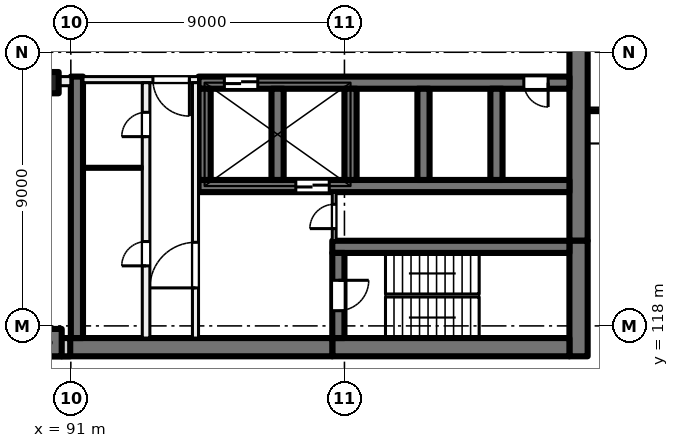
"""IFC4 building model, lengths in metres.
Left out: names, types, materials, properties, quantities, classifications, styles, units other than length and angle.
Written with IfcOpenShell. Run it as: python <this file> out.ifc"""

import sys

from ifc_helpers import new_model, si_unit, direction, frame, frame_2d, origin, origin_2d, place, context, subcontext, project, spatial, rectangle, extrude, element, fill, save


model = new_model("IFC4")
c1 = context("Model", 3, precision=1e-05, world=origin(), true_north=direction((0.0, 1.0)))
c2 = subcontext(c1, "Body", "Model", "MODEL_VIEW")
j1 = project(units=[si_unit("LENGTHUNIT", "METRE"), si_unit("PLANEANGLEUNIT", "RADIAN")], contexts=[c1])
p1 = place(None, origin())
s1 = spatial("IfcSite", under=j1, at=p1, CompositionType="ELEMENT")
p2 = place(p1, origin())
s2 = spatial("IfcBuilding", under=s1, at=p2, CompositionType="ELEMENT")
p3 = place(p2, frame((0.0, 0.0, 31.5)))
s3 = spatial("IfcBuildingStorey", under=s2, at=p3, CompositionType="ELEMENT", Elevation=31.5)
p4 = place(p3, frame((90.25, 126.0, 0.0), z_axis=(0.0, 0.0, 1.0), x_axis=(1.0, 0.0, 0.0)))
e1 = element("IfcColumn", 1, at=p4, inside=s3, PredefinedType="COLUMN", context=c2, shape_type="SweptSolid", body=[
    extrude(rectangle(XDim=0.7, YDim=0.7, at=origin_2d()), origin(), (0.0, 0.0, 1.0), 4.0),
])
p5 = place(p3, frame((90.25, 117.45, 0.0), z_axis=(0.0, 0.0, 1.0), x_axis=(1.0, 0.0, 0.0)))
e2 = element("IfcColumn", 2, at=p5, inside=s3, PredefinedType="COLUMN", context=c2, shape_type="SweptSolid", body=[
    extrude(rectangle(XDim=0.9, YDim=0.9, at=origin_2d()), origin(), (0.0, 0.0, 1.0), 4.0),
])
p6 = place(p3, frame((107.7, 135.2, 0.0), z_axis=(0.0, 0.0, 1.0), x_axis=(0.0, -1.0, 0.0)))
e3 = element("IfcWall", 3, at=p6, inside=s3, PredefinedType="SHEAR", context=c2, shape_type="SweptSolid", body=[
    extrude(rectangle(XDim=14.4, YDim=0.6, at=frame_2d((7.2, 0.0))), origin(), (0.0, 0.0, 1.0), 4.0),
])
p7 = place(p6, frame((6.3, 0.0, 0.0)))
e4 = element("IfcOpeningElement", 4, at=p7, cuts=e3, PredefinedType="OPENING", context=c2, shape_type="SweptSolid", body=[
    extrude(rectangle(XDim=1.8, YDim=2.1, at=frame_2d((0.9, 1.05))), frame((0.0, 0.31, 0.0), z_axis=(0.0, -1.0, 0.0), x_axis=(1.0, 0.0, 0.0)), (0.0, 0.0, 1.0), 0.62),
])
p8 = place(p3, frame((107.7, 120.8, 0.0), z_axis=(0.0, 0.0, 1.0), x_axis=(0.0, -1.0, 0.0)))
e5 = element("IfcWall", 5, at=p8, inside=s3, PredefinedType="SHEAR", context=c2, shape_type="SweptSolid", body=[
    extrude(rectangle(XDim=3.8, YDim=0.6, at=frame_2d((1.9, 0.0))), origin(), (0.0, 0.0, 1.0), 4.0),
])
p9 = place(p3, frame((107.4, 117.3, 0.0), z_axis=(0.0, 0.0, 1.0), x_axis=(-1.0, 0.0, 0.0)))
e6 = element("IfcWall", 6, at=p9, inside=s3, PredefinedType="SHEAR", context=c2, shape_type="SweptSolid", body=[
    extrude(rectangle(XDim=7.8, YDim=0.6, at=frame_2d((3.9, 0.0))), origin(), (0.0, 0.0, 1.0), 4.0),
])
p10 = place(p3, frame((99.6, 117.3, 0.0), z_axis=(0.0, 0.0, 1.0), x_axis=(-1.0, 0.0, 0.0)))
e7 = element("IfcWall", 7, at=p10, inside=s3, PredefinedType="SHEAR", context=c2, shape_type="SweptSolid", body=[
    extrude(rectangle(XDim=8.9, YDim=0.6, at=frame_2d((4.45, 0.0))), origin(), (0.0, 0.0, 1.0), 4.0),
])
p11 = place(p3, frame((107.4, 120.6, 0.0), z_axis=(0.0, 0.0, 1.0), x_axis=(-1.0, 0.0, 0.0)))
e8 = element("IfcWall", 8, at=p11, inside=s3, PredefinedType="SHEAR", context=c2, shape_type="SweptSolid", body=[
    extrude(rectangle(XDim=7.8, YDim=0.4, at=frame_2d((3.9, 0.0))), origin(), (0.0, 0.0, 1.0), 4.0),
])
p12 = place(p3, frame((99.8, 120.4, 0.0), z_axis=(0.0, 0.0, 1.0), x_axis=(0.0, -1.0, 0.0)))
e9 = element("IfcWall", 9, at=p12, inside=s3, PredefinedType="SHEAR", context=c2, shape_type="SweptSolid", body=[
    extrude(rectangle(XDim=2.8, YDim=0.4, at=frame_2d((1.4, 0.0))), origin(), (0.0, 0.0, 1.0), 4.0),
])
p13 = place(p12, frame((0.9, 0.0, 0.0)))
e10 = element("IfcOpeningElement", 10, at=p13, cuts=e9, PredefinedType="OPENING", context=c2, shape_type="SweptSolid", body=[
    extrude(rectangle(XDim=1.0, YDim=2.1, at=frame_2d((0.5, 1.05))), frame((0.0, 0.21, 0.0), z_axis=(0.0, -1.0, 0.0), x_axis=(1.0, 0.0, 0.0)), (0.0, 0.0, 1.0), 0.42),
])
p14 = place(p3, frame((107.4, 126.0, 0.0), z_axis=(0.0, 0.0, 1.0), x_axis=(-1.0, 0.0, 0.0)))
e11 = element("IfcWall", 11, at=p14, inside=s3, PredefinedType="SHEAR", context=c2, shape_type="SweptSolid", body=[
    extrude(rectangle(XDim=12.2, YDim=0.4, at=frame_2d((6.1, 0.0))), origin(), (0.0, 0.0, 1.0), 4.0),
])
p15 = place(p14, frame((10.25, 0.0, 0.0)))
e12 = element("IfcOpeningElement", 12, at=p15, cuts=e11, PredefinedType="OPENING", context=c2, shape_type="SweptSolid", body=[
    extrude(rectangle(XDim=1.1, YDim=2.1, at=frame_2d((0.55, 1.05))), frame((0.0, 0.21, 0.0), z_axis=(0.0, -1.0, 0.0), x_axis=(1.0, 0.0, 0.0)), (0.0, 0.0, 1.0), 0.42),
])
p16 = place(p14, frame((0.7, 0.0, 0.0)))
e13 = element("IfcOpeningElement", 13, at=p16, cuts=e11, PredefinedType="OPENING", context=c2, shape_type="SweptSolid", body=[
    extrude(rectangle(XDim=0.8, YDim=2.1, at=frame_2d((0.4, 1.05))), frame((0.0, 0.21, 0.0), z_axis=(0.0, -1.0, 0.0), x_axis=(1.0, 0.0, 0.0)), (0.0, 0.0, 1.0), 0.42),
])
p17 = place(p3, frame((107.4, 122.6, 0.0), z_axis=(0.0, 0.0, 1.0), x_axis=(-1.0, 0.0, 0.0)))
e14 = element("IfcWall", 14, at=p17, inside=s3, PredefinedType="SHEAR", context=c2, shape_type="SweptSolid", body=[
    extrude(rectangle(XDim=12.2, YDim=0.4, at=frame_2d((6.1, 0.0))), origin(), (0.0, 0.0, 1.0), 4.0),
])
p18 = place(p17, frame((7.9, 0.0, 0.0)))
e15 = element("IfcOpeningElement", 15, at=p18, cuts=e14, PredefinedType="OPENING", context=c2, shape_type="SweptSolid", body=[
    extrude(rectangle(XDim=1.1, YDim=2.1, at=frame_2d((0.55, 1.05))), frame((0.0, 0.21, 0.0), z_axis=(0.0, -1.0, 0.0), x_axis=(1.0, 0.0, 0.0)), (0.0, 0.0, 1.0), 0.42),
])
for number, where, z_axis, x_axis in (
    (16, (105.0, 125.8, 0.0), (0.0, 0.0, 1.0), (0.0, -1.0, 0.0)),
    (17, (102.6, 125.8, 0.0), (0.0, 0.0, 1.0), (0.0, -1.0, 0.0)),
    (18, (100.2, 125.8, 0.0), (0.0, 0.0, 1.0), (0.0, -1.0, 0.0)),
    (19, (97.8, 125.8, 0.0), (0.0, 0.0, 1.0), (0.0, -1.0, 0.0)),
    (20, (95.4, 125.8, 0.0), (0.0, 0.0, 1.0), (0.0, -1.0, 0.0)),
):
    element("IfcWall", number, at=place(p3, frame(where, z_axis=z_axis, x_axis=x_axis)), inside=s3, PredefinedType="SHEAR", context=c2, shape_type="SweptSolid", body=[
        extrude(rectangle(XDim=3.0, YDim=0.4, at=frame_2d((1.5, 0.0))), origin(), (0.0, 0.0, 1.0), 4.0),
    ])
p19 = place(p3, frame((91.2, 126.2, 0.0), z_axis=(0.0, 0.0, 1.0), x_axis=(0.0, -1.0, 0.0)))
e21 = element("IfcWall", 21, at=p19, inside=s3, PredefinedType="SHEAR", context=c2, shape_type="SweptSolid", body=[
    extrude(rectangle(XDim=8.6, YDim=0.4, at=frame_2d((4.3, 0.0))), origin(), (0.0, 0.0, 1.0), 4.0),
])
p20 = place(p3, frame((90.98, 117.3, 0.0), z_axis=(0.0, 0.0, 1.0), x_axis=(-1.0, 0.0, 0.0)))
e22 = element("IfcWall", 22, at=p20, inside=s3, PredefinedType="SOLIDWALL", context=c2, shape_type="SweptSolid", body=[
    extrude(rectangle(XDim=33.745, YDim=0.6, at=frame_2d((16.873, 0.0))), origin(), (0.0, 0.0, 1.0), 3.625),
])
p21 = place(p20, frame((1.48, 0.0, 0.9)))
e23 = element("IfcOpeningElement", 23, at=p21, cuts=e22, PredefinedType="OPENING", context=c2, shape_type="SweptSolid", body=[
    extrude(rectangle(XDim=3.0, YDim=2.4, at=frame_2d((1.5, 1.2))), frame((0.0, 0.31, 0.0), z_axis=(0.0, -1.0, 0.0), x_axis=(1.0, 0.0, 0.0)), (0.0, 0.0, 1.0), 0.62),
])
p22 = place(p20, frame((5.98, 0.0, 0.9)))
e24 = element("IfcOpeningElement", 24, at=p22, cuts=e22, PredefinedType="OPENING", context=c2, shape_type="SweptSolid", body=[
    extrude(rectangle(XDim=3.0, YDim=2.4, at=frame_2d((1.5, 1.2))), frame((0.0, 0.31, 0.0), z_axis=(0.0, -1.0, 0.0), x_axis=(1.0, 0.0, 0.0)), (0.0, 0.0, 1.0), 0.62),
])
p23 = place(p20, frame((10.48, 0.0, 0.9)))
e25 = element("IfcOpeningElement", 25, at=p23, cuts=e22, PredefinedType="OPENING", context=c2, shape_type="SweptSolid", body=[
    extrude(rectangle(XDim=3.0, YDim=2.4, at=frame_2d((1.5, 1.2))), frame((0.0, 0.31, 0.0), z_axis=(0.0, -1.0, 0.0), x_axis=(1.0, 0.0, 0.0)), (0.0, 0.0, 1.0), 0.62),
])
p24 = place(p20, frame((14.98, 0.0, 0.9)))
e26 = element("IfcOpeningElement", 26, at=p24, cuts=e22, PredefinedType="OPENING", context=c2, shape_type="SweptSolid", body=[
    extrude(rectangle(XDim=3.0, YDim=2.4, at=frame_2d((1.5, 1.2))), frame((0.0, 0.31, 0.0), z_axis=(0.0, -1.0, 0.0), x_axis=(1.0, 0.0, 0.0)), (0.0, 0.0, 1.0), 0.62),
])
p25 = place(p20, frame((19.48, 0.0, 0.9)))
e27 = element("IfcOpeningElement", 27, at=p25, cuts=e22, PredefinedType="OPENING", context=c2, shape_type="SweptSolid", body=[
    extrude(rectangle(XDim=3.0, YDim=2.4, at=frame_2d((1.5, 1.2))), frame((0.0, 0.31, 0.0), z_axis=(0.0, -1.0, 0.0), x_axis=(1.0, 0.0, 0.0)), (0.0, 0.0, 1.0), 0.62),
])
p26 = place(p20, frame((23.98, 0.0, 0.9)))
e28 = element("IfcOpeningElement", 28, at=p26, cuts=e22, PredefinedType="OPENING", context=c2, shape_type="SweptSolid", body=[
    extrude(rectangle(XDim=3.0, YDim=2.4, at=frame_2d((1.5, 1.2))), frame((0.0, 0.31, 0.0), z_axis=(0.0, -1.0, 0.0), x_axis=(1.0, 0.0, 0.0)), (0.0, 0.0, 1.0), 0.62),
])
p27 = place(p20, frame((29.08, 0.0, 0.0)))
e29 = element("IfcOpeningElement", 29, at=p27, cuts=e22, PredefinedType="OPENING", context=c2, shape_type="SweptSolid", body=[
    extrude(rectangle(XDim=1.8, YDim=2.4, at=frame_2d((0.9, 1.2))), frame((0.0, 0.31, 0.0), z_axis=(0.0, -1.0, 0.0), x_axis=(1.0, 0.0, 0.0)), (0.0, 0.0, 1.0), 0.62),
])
p28 = place(p3, frame((95.2, 126.1, 0.0), z_axis=(0.0, 0.0, 1.0), x_axis=(-1.0, 0.0, 0.0)))
e30 = element("IfcWall", 30, at=p28, inside=s3, PredefinedType="PARTITIONING", context=c2, shape_type="SweptSolid", body=[
    extrude(rectangle(XDim=3.8, YDim=0.2, at=frame_2d((1.9, 0.0))), origin(), (0.0, 0.0, 1.0), 3.625),
])
p29 = place(p28, frame((0.3, 0.0, 0.0)))
e31 = element("IfcOpeningElement", 31, at=p29, cuts=e30, PredefinedType="OPENING", context=c2, shape_type="SweptSolid", body=[
    extrude(rectangle(XDim=1.2, YDim=2.1, at=frame_2d((0.6, 1.05))), frame((0.0, 0.11, 0.0), z_axis=(0.0, -1.0, 0.0), x_axis=(1.0, 0.0, 0.0)), (0.0, 0.0, 1.0), 0.22),
])
p30 = place(p3, frame((95.1, 117.6, 0.0), z_axis=(0.0, 0.0, 1.0), x_axis=(0.0, 1.0, 0.0)))
e32 = element("IfcWall", 32, at=p30, inside=s3, PredefinedType="PARTITIONING", context=c2, shape_type="SweptSolid", body=[
    extrude(rectangle(XDim=8.4, YDim=0.2, at=frame_2d((4.2, 0.0))), origin(), (0.0, 0.0, 1.0), 3.625),
])
p31 = place(p30, frame((1.65, 0.0, 0.0)))
e33 = element("IfcOpeningElement", 33, at=p31, cuts=e32, PredefinedType="OPENING", context=c2, shape_type="SweptSolid", body=[
    extrude(rectangle(XDim=1.5, YDim=2.1, at=frame_2d((0.75, 1.05))), frame((0.0, 0.11, 0.0), z_axis=(0.0, -1.0, 0.0), x_axis=(1.0, 0.0, 0.0)), (0.0, 0.0, 1.0), 0.22),
])
p32 = place(p3, frame((93.475, 117.6, 0.0), z_axis=(0.0, 0.0, 1.0), x_axis=(0.0, 1.0, 0.0)))
e34 = element("IfcWall", 34, at=p32, inside=s3, PredefinedType="PARTITIONING", context=c2, shape_type="SweptSolid", body=[
    extrude(rectangle(XDim=8.4, YDim=0.25, at=frame_2d((4.2, 0.0))), origin(), (0.0, 0.0, 1.0), 3.625),
])
p33 = place(p32, frame((6.625, 0.0, 0.0)))
e35 = element("IfcOpeningElement", 35, at=p33, cuts=e34, PredefinedType="OPENING", context=c2, shape_type="SweptSolid", body=[
    extrude(rectangle(XDim=0.8, YDim=2.1, at=frame_2d((0.4, 1.05))), frame((0.0, 0.135, 0.0), z_axis=(0.0, -1.0, 0.0), x_axis=(1.0, 0.0, 0.0)), (0.0, 0.0, 1.0), 0.27),
])
p34 = place(p32, frame((2.375, 0.0, 0.0)))
e36 = element("IfcOpeningElement", 36, at=p34, cuts=e34, PredefinedType="OPENING", context=c2, shape_type="SweptSolid", body=[
    extrude(rectangle(XDim=0.8, YDim=2.1, at=frame_2d((0.4, 1.05))), frame((0.0, 0.135, 0.0), z_axis=(0.0, -1.0, 0.0), x_axis=(1.0, 0.0, 0.0)), (0.0, 0.0, 1.0), 0.27),
])
p35 = place(p3, frame((99.663, 120.8, 0.0), z_axis=(0.0, 0.0, 1.0), x_axis=(0.0, 1.0, 0.0)))
e37 = element("IfcWall", 37, at=p35, inside=s3, PredefinedType="PARTITIONING", context=c2, shape_type="SweptSolid", body=[
    extrude(rectangle(XDim=1.6, YDim=0.125, at=frame_2d((0.8, 0.0))), origin(), (0.0, 0.0, 1.0), 3.625),
])
p36 = place(p35, frame((0.4, 0.0, 0.0)))
e38 = element("IfcOpeningElement", 38, at=p36, cuts=e37, PredefinedType="OPENING", context=c2, shape_type="SweptSolid", body=[
    extrude(rectangle(XDim=0.8, YDim=2.1, at=frame_2d((0.4, 1.05))), frame((0.0, 0.073, 0.0), z_axis=(0.0, -1.0, 0.0), x_axis=(1.0, 0.0, 0.0)), (0.0, 0.0, 1.0), 0.145),
])
p37 = place(p3, frame((93.35, 123.2, 0.0), z_axis=(0.0, 0.0, 1.0), x_axis=(-1.0, 0.0, 0.0)))
e39 = element("IfcWall", 39, at=p37, inside=s3, PredefinedType="PARTITIONING", context=c2, shape_type="SweptSolid", body=[
    extrude(rectangle(XDim=1.95, YDim=0.1, at=frame_2d((0.975, 0.0))), origin(), (0.0, 0.0, 1.0), 3.625),
])
p38 = place(p3, frame((91.0, 126.05, 0.0), z_axis=(0.0, 0.0, 1.0), x_axis=(-1.0, 0.0, 0.0)))
e40 = element("IfcWall", 40, at=p38, inside=s3, PredefinedType="PARTITIONING", context=c2, shape_type="SweptSolid", body=[
    extrude(rectangle(XDim=43.785, YDim=0.3, at=frame_2d((21.893, 0.0))), origin(), (0.0, 0.0, 1.0), 3.625),
])
p39 = place(p38, frame((2.125, 0.0, 0.0)))
e41 = element("IfcOpeningElement", 41, at=p39, cuts=e40, PredefinedType="OPENING", context=c2, shape_type="SweptSolid", body=[
    extrude(rectangle(XDim=1.0, YDim=2.1, at=frame_2d((0.5, 1.05))), frame((0.0, 0.16, 0.0), z_axis=(0.0, -1.0, 0.0), x_axis=(1.0, 0.0, 0.0)), (0.0, 0.0, 1.0), 0.32),
])
p40 = place(p38, frame((7.0, 0.0, 0.0)))
e42 = element("IfcOpeningElement", 42, at=p40, cuts=e40, PredefinedType="OPENING", context=c2, shape_type="SweptSolid", body=[
    extrude(rectangle(XDim=1.0, YDim=2.1, at=frame_2d((0.5, 1.05))), frame((0.0, 0.16, 0.0), z_axis=(0.0, -1.0, 0.0), x_axis=(1.0, 0.0, 0.0)), (0.0, 0.0, 1.0), 0.32),
])
p41 = place(p38, frame((11.5, 0.0, 0.0)))
e43 = element("IfcOpeningElement", 43, at=p41, cuts=e40, PredefinedType="OPENING", context=c2, shape_type="SweptSolid", body=[
    extrude(rectangle(XDim=1.0, YDim=2.1, at=frame_2d((0.5, 1.05))), frame((0.0, 0.16, 0.0), z_axis=(0.0, -1.0, 0.0), x_axis=(1.0, 0.0, 0.0)), (0.0, 0.0, 1.0), 0.32),
])
p42 = place(p38, frame((21.35, 0.0, 0.0)))
e44 = element("IfcOpeningElement", 44, at=p42, cuts=e40, PredefinedType="OPENING", context=c2, shape_type="SweptSolid", body=[
    extrude(rectangle(XDim=0.8, YDim=2.1, at=frame_2d((0.4, 1.05))), frame((0.0, 0.16, 0.0), z_axis=(0.0, -1.0, 0.0), x_axis=(1.0, 0.0, 0.0)), (0.0, 0.0, 1.0), 0.32),
])
p43 = place(p38, frame((16.75, 0.0, 0.0)))
e45 = element("IfcOpeningElement", 45, at=p43, cuts=e40, PredefinedType="OPENING", context=c2, shape_type="SweptSolid", body=[
    extrude(rectangle(XDim=1.0, YDim=2.1, at=frame_2d((0.5, 1.05))), frame((0.0, 0.16, 0.0), z_axis=(0.0, -1.0, 0.0), x_axis=(1.0, 0.0, 0.0)), (0.0, 0.0, 1.0), 0.32),
])
p44 = place(p38, frame((25.0, 0.0, 0.0)))
e46 = element("IfcOpeningElement", 46, at=p44, cuts=e40, PredefinedType="OPENING", context=c2, shape_type="SweptSolid", body=[
    extrude(rectangle(XDim=1.0, YDim=2.1, at=frame_2d((0.5, 1.05))), frame((0.0, 0.16, 0.0), z_axis=(0.0, -1.0, 0.0), x_axis=(1.0, 0.0, 0.0)), (0.0, 0.0, 1.0), 0.32),
])
p45 = place(p38, frame((39.296, 0.0, 0.0)))
e47 = element("IfcOpeningElement", 47, at=p45, cuts=e40, PredefinedType="OPENING", context=c2, shape_type="SweptSolid", body=[
    extrude(rectangle(XDim=1.8, YDim=2.1, at=frame_2d((0.9, 1.05))), frame((0.0, 0.16, 0.0), z_axis=(0.0, -1.0, 0.0), x_axis=(1.0, 0.0, 0.0)), (0.0, 0.0, 1.0), 0.32),
])
p46 = place(p15, origin())
e48 = element("IfcDoor", 48, at=p46, inside=s3, OperationType="DOUBLE_DOOR_SLIDING", PredefinedType="DOOR", context=c2, shape_type="SweptSolid", body=[
    extrude(rectangle(XDim=1.1, YDim=2.1, at=frame_2d((0.55, 1.05))), frame((0.0, 0.025, 0.0), z_axis=(0.0, -1.0, 0.0), x_axis=(1.0, 0.0, 0.0)), (0.0, 0.0, 1.0), 0.05),
])
fill(e12, e48)
p47 = place(p16, origin())
e49 = element("IfcDoor", 49, at=p47, inside=s3, OperationType="SINGLE_SWING_LEFT", PredefinedType="DOOR", context=c2, shape_type="SweptSolid", body=[
    extrude(rectangle(XDim=0.8, YDim=2.1, at=frame_2d((0.4, 1.05))), frame((0.0, 0.025, 0.0), z_axis=(0.0, -1.0, 0.0), x_axis=(1.0, 0.0, 0.0)), (0.0, 0.0, 1.0), 0.05),
])
fill(e13, e49)
p48 = place(p29, origin())
e50 = element("IfcDoor", 50, at=p48, inside=s3, OperationType="DOUBLE_DOOR_SINGLE_SWING", PredefinedType="DOOR", context=c2, shape_type="SweptSolid", body=[
    extrude(rectangle(XDim=1.2, YDim=2.1, at=frame_2d((0.6, 1.05))), frame((0.0, 0.025, 0.0), z_axis=(0.0, -1.0, 0.0), x_axis=(1.0, 0.0, 0.0)), (0.0, 0.0, 1.0), 0.05),
])
fill(e31, e50)
p49 = place(p31, origin())
e51 = element("IfcDoor", 51, at=p49, inside=s3, OperationType="DOUBLE_DOOR_SINGLE_SWING", PredefinedType="DOOR", context=c2, shape_type="SweptSolid", body=[
    extrude(rectangle(XDim=1.5, YDim=2.1, at=frame_2d((0.75, 1.05))), frame((0.0, 0.025, 0.0), z_axis=(0.0, -1.0, 0.0), x_axis=(1.0, 0.0, 0.0)), (0.0, 0.0, 1.0), 0.05),
])
fill(e33, e51)
p50 = place(p13, origin())
e52 = element("IfcDoor", 52, at=p50, inside=s3, OperationType="SINGLE_SWING_LEFT", PredefinedType="DOOR", context=c2, shape_type="SweptSolid", body=[
    extrude(rectangle(XDim=1.0, YDim=2.1, at=frame_2d((0.5, 1.05))), frame((0.0, 0.025, 0.0), z_axis=(0.0, -1.0, 0.0), x_axis=(1.0, 0.0, 0.0)), (0.0, 0.0, 1.0), 0.05),
])
fill(e10, e52)
p51 = place(p36, origin())
e53 = element("IfcDoor", 53, at=p51, inside=s3, OperationType="SINGLE_SWING_RIGHT", PredefinedType="DOOR", context=c2, shape_type="SweptSolid", body=[
    extrude(rectangle(XDim=0.8, YDim=2.1, at=frame_2d((0.4, 1.05))), frame((0.0, 0.025, 0.0), z_axis=(0.0, -1.0, 0.0), x_axis=(1.0, 0.0, 0.0)), (0.0, 0.0, 1.0), 0.05),
])
fill(e38, e53)
p52 = place(p33, origin())
e54 = element("IfcDoor", 54, at=p52, inside=s3, OperationType="SINGLE_SWING_LEFT", PredefinedType="DOOR", context=c2, shape_type="SweptSolid", body=[
    extrude(rectangle(XDim=0.8, YDim=2.1, at=frame_2d((0.4, 1.05))), frame((0.0, 0.025, 0.0), z_axis=(0.0, -1.0, 0.0), x_axis=(1.0, 0.0, 0.0)), (0.0, 0.0, 1.0), 0.05),
])
fill(e35, e54)
p53 = place(p34, origin())
e55 = element("IfcDoor", 55, at=p53, inside=s3, OperationType="SINGLE_SWING_RIGHT", PredefinedType="DOOR", context=c2, shape_type="SweptSolid", body=[
    extrude(rectangle(XDim=0.8, YDim=2.1, at=frame_2d((0.4, 1.05))), frame((0.0, 0.025, 0.0), z_axis=(0.0, -1.0, 0.0), x_axis=(1.0, 0.0, 0.0)), (0.0, 0.0, 1.0), 0.05),
])
fill(e36, e55)
p54 = place(p18, origin())
e56 = element("IfcDoor", 56, at=p54, inside=s3, OperationType="DOUBLE_DOOR_SLIDING", PredefinedType="DOOR", context=c2, shape_type="SweptSolid", body=[
    extrude(rectangle(XDim=1.1, YDim=2.1, at=frame_2d((0.55, 1.05))), frame((0.0, 0.025, 0.0), z_axis=(0.0, -1.0, 0.0), x_axis=(1.0, 0.0, 0.0)), (0.0, 0.0, 1.0), 0.05),
])
fill(e15, e56)
save(model, sys.argv[1])
